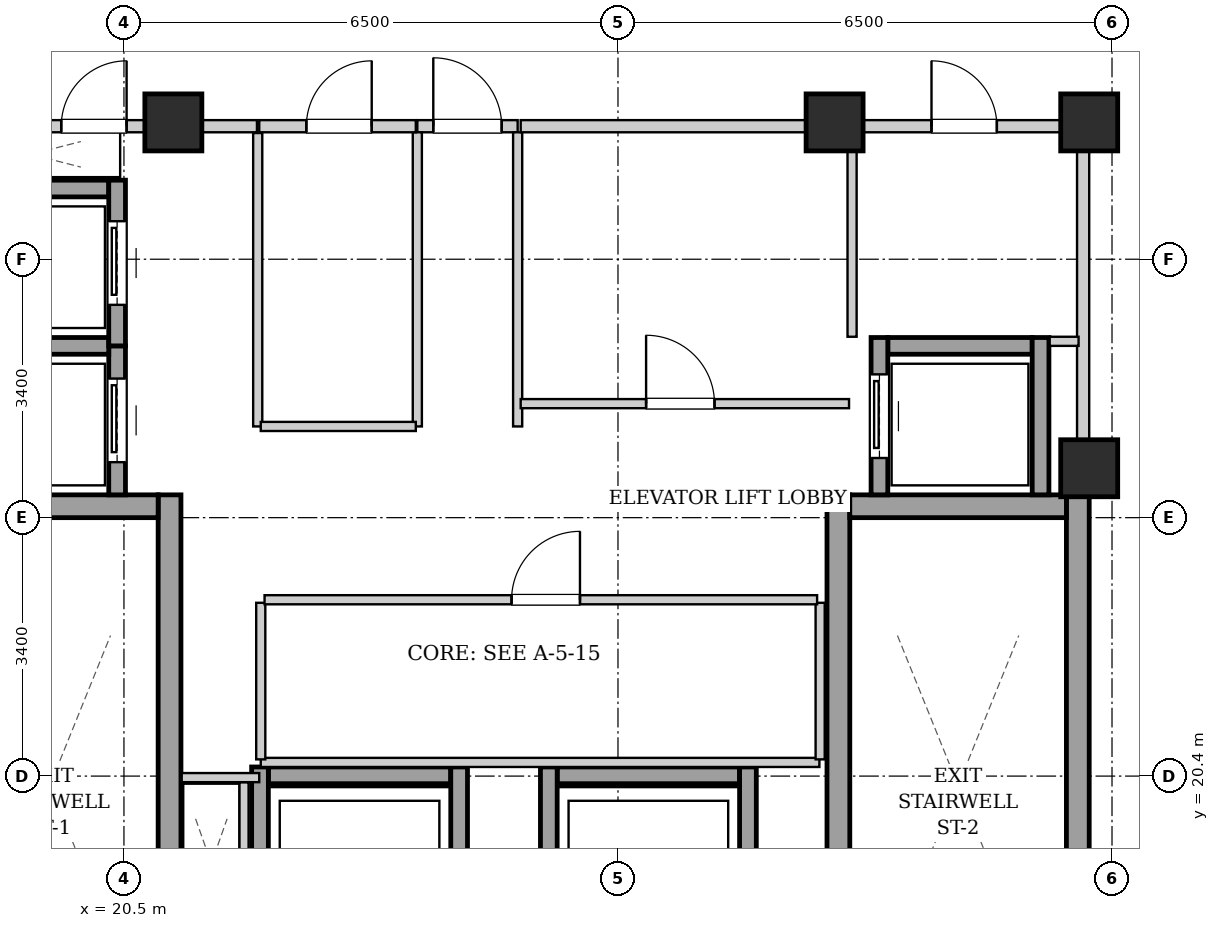
"""IFC4 building model, lengths in metres.
Left out: names, types, materials, properties, quantities, classifications, styles, units other than length and angle.
Written with IfcOpenShell. Run it as: python <this file> out.ifc"""

import sys

from ifc_helpers import new_model, si_unit, direction, frame, frame_2d, origin, origin_2d, place, context, subcontext, project, spatial, rectangle, extrude, element, fill, save


model = new_model("IFC4")
c1 = context("Model", 3, precision=1e-05, world=origin(), true_north=direction((0.0, 1.0)))
c2 = subcontext(c1, "Body", "Model", "MODEL_VIEW")
j1 = project(units=[si_unit("LENGTHUNIT", "METRE"), si_unit("PLANEANGLEUNIT", "RADIAN")], contexts=[c1])
p1 = place(None, origin())
s1 = spatial("IfcSite", under=j1, at=p1, CompositionType="ELEMENT")
p2 = place(p1, origin())
s2 = spatial("IfcBuilding", under=s1, at=p2, CompositionType="ELEMENT")
p3 = place(p2, frame((0.0, 0.0, 224.1)))
s3 = spatial("IfcBuildingStorey", under=s2, at=p3, CompositionType="ELEMENT", Elevation=224.1)
for number, where, z_axis, x_axis in (
    (1, (21.15, 29.0, 0.0), (0.0, 0.0, 1.0), (1.0, 0.0, 0.0)),
    (2, (29.85, 29.0, 0.0), (0.0, 0.0, 1.0), (1.0, 0.0, 0.0)),
    (3, (33.2, 29.0, 0.0), (0.0, 0.0, 1.0), (1.0, 0.0, 0.0)),
    (4, (33.2, 24.45, 0.0), (0.0, 0.0, 1.0), (1.0, 0.0, 0.0)),
):
    element("IfcColumn", number, at=place(p3, frame(where, z_axis=z_axis, x_axis=x_axis)), inside=s3, PredefinedType="COLUMN", context=c2, shape_type="SweptSolid", body=[
        extrude(rectangle(XDim=0.75, YDim=0.75, at=origin_2d()), origin(), (0.0, 0.0, 1.0), 3.4),
    ])
p4 = place(p3, frame((21.1, 15.1, 0.0), z_axis=(0.0, 0.0, 1.0), x_axis=(0.0, 1.0, 0.0)))
e5 = element("IfcWall", 5, at=p4, inside=s3, PredefinedType="SHEAR", context=c2, shape_type="SweptSolid", body=[
    extrude(rectangle(XDim=9.0, YDim=0.3, at=frame_2d((4.5, 0.0))), origin(), (0.0, 0.0, 1.0), 3.14),
])
p5 = place(p3, frame((18.1, 23.95, 0.0), z_axis=(0.0, 0.0, 1.0), x_axis=(1.0, 0.0, 0.0)))
e6 = element("IfcWall", 6, at=p5, inside=s3, PredefinedType="SHEAR", context=c2, shape_type="SweptSolid", body=[
    extrude(rectangle(XDim=2.85, YDim=0.3, at=frame_2d((1.425, 0.0))), origin(), (0.0, 0.0, 1.0), 3.14),
])
for number, where, z_axis, x_axis in (
    (7, (29.9, 15.1, 0.0), (0.0, 0.0, 1.0), (0.0, 1.0, 0.0)),
    (8, (33.05, 15.1, 0.0), (0.0, 0.0, 1.0), (0.0, 1.0, 0.0)),
):
    element("IfcWall", number, at=place(p3, frame(where, z_axis=z_axis, x_axis=x_axis)), inside=s3, PredefinedType="SHEAR", context=c2, shape_type="SweptSolid", body=[
        extrude(rectangle(XDim=9.0, YDim=0.3, at=frame_2d((4.5, 0.0))), origin(), (0.0, 0.0, 1.0), 3.14),
    ])
p6 = place(p3, frame((30.05, 23.95, 0.0), z_axis=(0.0, 0.0, 1.0), x_axis=(1.0, 0.0, 0.0)))
e9 = element("IfcWall", 9, at=p6, inside=s3, PredefinedType="SHEAR", context=c2, shape_type="SweptSolid", body=[
    extrude(rectangle(XDim=2.85, YDim=0.3, at=frame_2d((1.425, 0.0))), origin(), (0.0, 0.0, 1.0), 3.14),
])
p7 = place(p3, frame((20.41, 24.1, 0.0), z_axis=(0.0, 0.0, 1.0), x_axis=(0.0, 1.0, 0.0)))
e10 = element("IfcWall", 10, at=p7, inside=s3, PredefinedType="SHEAR", context=c2, shape_type="SweptSolid", body=[
    extrude(rectangle(XDim=1.96, YDim=0.22, at=frame_2d((0.98, 0.0))), origin(), (0.0, 0.0, 1.0), 3.14),
])
p8 = place(p7, frame((0.43, 0.0, 0.0)))
e11 = element("IfcOpeningElement", 11, at=p8, cuts=e10, PredefinedType="OPENING", context=c2, shape_type="SweptSolid", body=[
    extrude(rectangle(XDim=1.1, YDim=2.15, at=frame_2d((0.55, 1.075))), frame((0.0, 0.12, 0.0), z_axis=(0.0, -1.0, 0.0), x_axis=(1.0, 0.0, 0.0)), (0.0, 0.0, 1.0), 0.24),
])
for number, where, z_axis, x_axis in (
    (12, (18.4, 26.06, 0.0), (0.0, 0.0, 1.0), (1.0, 0.0, 0.0)),
    (13, (18.4, 28.13, 0.0), (0.0, 0.0, 1.0), (1.0, 0.0, 0.0)),
):
    element("IfcWall", number, at=place(p3, frame(where, z_axis=z_axis, x_axis=x_axis)), inside=s3, PredefinedType="SHEAR", context=c2, shape_type="SweptSolid", body=[
        extrude(rectangle(XDim=1.9, YDim=0.22, at=frame_2d((0.95, 0.0))), origin(), (0.0, 0.0, 1.0), 3.14),
    ])
p9 = place(p3, frame((20.41, 26.06, 0.0), z_axis=(0.0, 0.0, 1.0), x_axis=(0.0, 1.0, 0.0)))
e14 = element("IfcWall", 14, at=p9, inside=s3, PredefinedType="SHEAR", context=c2, shape_type="SweptSolid", body=[
    extrude(rectangle(XDim=2.18, YDim=0.22, at=frame_2d((1.09, 0.0))), origin(), (0.0, 0.0, 1.0), 3.14),
])
p10 = place(p9, frame((0.54, 0.0, 0.0)))
e15 = element("IfcOpeningElement", 15, at=p10, cuts=e14, PredefinedType="OPENING", context=c2, shape_type="SweptSolid", body=[
    extrude(rectangle(XDim=1.1, YDim=2.15, at=frame_2d((0.55, 1.075))), frame((0.0, 0.12, 0.0), z_axis=(0.0, -1.0, 0.0), x_axis=(1.0, 0.0, 0.0)), (0.0, 0.0, 1.0), 0.24),
])
p11 = place(p3, frame((30.55, 26.06, 0.0), z_axis=(0.0, 0.0, 1.0), x_axis=(1.0, 0.0, 0.0)))
e16 = element("IfcWall", 16, at=p11, inside=s3, PredefinedType="SHEAR", context=c2, shape_type="SweptSolid", body=[
    extrude(rectangle(XDim=1.9, YDim=0.22, at=frame_2d((0.95, 0.0))), origin(), (0.0, 0.0, 1.0), 3.14),
])
p12 = place(p3, frame((30.44, 24.1, 0.0), z_axis=(0.0, 0.0, 1.0), x_axis=(0.0, 1.0, 0.0)))
e17 = element("IfcWall", 17, at=p12, inside=s3, PredefinedType="SHEAR", context=c2, shape_type="SweptSolid", body=[
    extrude(rectangle(XDim=2.07, YDim=0.22, at=frame_2d((1.035, 0.0))), origin(), (0.0, 0.0, 1.0), 3.14),
])
p13 = place(p12, frame((0.485, 0.0, 0.0)))
e18 = element("IfcOpeningElement", 18, at=p13, cuts=e17, PredefinedType="OPENING", context=c2, shape_type="SweptSolid", body=[
    extrude(rectangle(XDim=1.1, YDim=2.15, at=frame_2d((0.55, 1.075))), frame((0.0, 0.12, 0.0), z_axis=(0.0, -1.0, 0.0), x_axis=(1.0, 0.0, 0.0)), (0.0, 0.0, 1.0), 0.24),
])
p14 = place(p3, frame((32.56, 24.1, 0.0), z_axis=(0.0, 0.0, 1.0), x_axis=(0.0, 1.0, 0.0)))
e19 = element("IfcWall", 19, at=p14, inside=s3, PredefinedType="SHEAR", context=c2, shape_type="SweptSolid", body=[
    extrude(rectangle(XDim=2.07, YDim=0.22, at=frame_2d((1.035, 0.0))), origin(), (0.0, 0.0, 1.0), 3.14),
])
p15 = place(p3, frame((22.4, 20.41, 0.0), z_axis=(0.0, 0.0, 1.0), x_axis=(1.0, 0.0, 0.0)))
e20 = element("IfcWall", 20, at=p15, inside=s3, PredefinedType="SHEAR", context=c2, shape_type="SweptSolid", body=[
    extrude(rectangle(XDim=2.4, YDim=0.22, at=frame_2d((1.2, 0.0))), origin(), (0.0, 0.0, 1.0), 3.14),
])
for number, where, z_axis, x_axis in (
    (21, (22.29, 17.98, 0.0), (0.0, 0.0, 1.0), (0.0, 1.0, 0.0)),
    (22, (24.91, 17.98, 0.0), (0.0, 0.0, 1.0), (0.0, 1.0, 0.0)),
):
    element("IfcWall", number, at=place(p3, frame(where, z_axis=z_axis, x_axis=x_axis)), inside=s3, PredefinedType="SHEAR", context=c2, shape_type="SweptSolid", body=[
        extrude(rectangle(XDim=2.54, YDim=0.22, at=frame_2d((1.27, 0.0))), origin(), (0.0, 0.0, 1.0), 3.14),
    ])
p16 = place(p3, frame((26.2, 20.41, 0.0), z_axis=(0.0, 0.0, 1.0), x_axis=(1.0, 0.0, 0.0)))
e23 = element("IfcWall", 23, at=p16, inside=s3, PredefinedType="SHEAR", context=c2, shape_type="SweptSolid", body=[
    extrude(rectangle(XDim=2.4, YDim=0.22, at=frame_2d((1.2, 0.0))), origin(), (0.0, 0.0, 1.0), 3.14),
])
for number, where, z_axis, x_axis in (
    (24, (26.09, 17.98, 0.0), (0.0, 0.0, 1.0), (0.0, 1.0, 0.0)),
    (25, (28.71, 17.98, 0.0), (0.0, 0.0, 1.0), (0.0, 1.0, 0.0)),
):
    element("IfcWall", number, at=place(p3, frame(where, z_axis=z_axis, x_axis=x_axis)), inside=s3, PredefinedType="SHEAR", context=c2, shape_type="SweptSolid", body=[
        extrude(rectangle(XDim=2.54, YDim=0.22, at=frame_2d((1.27, 0.0))), origin(), (0.0, 0.0, 1.0), 3.14),
    ])
p17 = place(p3, frame((33.12, 24.12, 0.0), z_axis=(0.0, 0.0, 1.0), x_axis=(0.0, 1.0, 0.0)))
e26 = element("IfcWall", 26, at=p17, inside=s3, PredefinedType="PARTITIONING", context=c2, shape_type="SweptSolid", body=[
    extrude(rectangle(XDim=4.76, YDim=0.16, at=frame_2d((2.38, 0.0))), origin(), (0.0, 0.0, 1.0), 3.14),
])
p18 = place(p3, frame((24.36, 28.95, 0.0), z_axis=(0.0, 0.0, 1.0), x_axis=(1.0, 0.0, 0.0)))
e27 = element("IfcWall", 27, at=p18, inside=s3, PredefinedType="PARTITIONING", context=c2, shape_type="SweptSolid", body=[
    extrude(rectangle(XDim=1.32, YDim=0.16, at=frame_2d((0.66, 0.0))), origin(), (0.0, 0.0, 1.0), 2.668),
])
p19 = place(p18, frame((0.21, 0.0, 0.0)))
e28 = element("IfcOpeningElement", 28, at=p19, cuts=e27, PredefinedType="OPENING", context=c2, shape_type="SweptSolid", body=[
    extrude(rectangle(XDim=0.9, YDim=2.05, at=frame_2d((0.45, 1.025))), frame((0.0, 0.09, 0.0), z_axis=(0.0, -1.0, 0.0), x_axis=(1.0, 0.0, 0.0)), (0.0, 0.0, 1.0), 0.18),
])
p20 = place(p3, frame((17.96, 28.95, 0.0), z_axis=(0.0, 0.0, 1.0), x_axis=(1.0, 0.0, 0.0)))
e29 = element("IfcWall", 29, at=p20, inside=s3, PredefinedType="PARTITIONING", context=c2, shape_type="SweptSolid", body=[
    extrude(rectangle(XDim=4.29, YDim=0.16, at=frame_2d((2.145, 0.0))), origin(), (0.0, 0.0, 1.0), 2.668),
])
p21 = place(p20, frame((1.715, 0.0, 0.0)))
e30 = element("IfcOpeningElement", 30, at=p21, cuts=e29, PredefinedType="OPENING", context=c2, shape_type="SweptSolid", body=[
    extrude(rectangle(XDim=0.86, YDim=2.05, at=frame_2d((0.43, 1.025))), frame((0.0, 0.09, 0.0), z_axis=(0.0, -1.0, 0.0), x_axis=(1.0, 0.0, 0.0)), (0.0, 0.0, 1.0), 0.18),
])
p22 = place(p3, frame((22.08, 18.2, 0.0), z_axis=(0.0, 0.0, 1.0), x_axis=(0.0, 1.0, 0.0)))
e31 = element("IfcWall", 31, at=p22, inside=s3, PredefinedType="PARTITIONING", context=c2, shape_type="SweptSolid", body=[
    extrude(rectangle(XDim=2.12, YDim=0.12, at=frame_2d((1.06, 0.0))), origin(), (0.0, 0.0, 1.0), 3.14),
])
p23 = place(p3, frame((22.28, 20.38, 0.0), z_axis=(0.0, 0.0, 1.0), x_axis=(-1.0, 0.0, 0.0)))
e32 = element("IfcWall", 32, at=p23, inside=s3, PredefinedType="PARTITIONING", context=c2, shape_type="SweptSolid", body=[
    extrude(rectangle(XDim=1.02, YDim=0.12, at=frame_2d((0.51, 0.0))), origin(), (0.0, 0.0, 1.0), 3.14),
])
for number, where, z_axis, x_axis in (
    (33, (24.36, 25.0, 0.0), (0.0, 0.0, 1.0), (0.0, 1.0, 0.0)),
    (34, (25.68, 25.0, 0.0), (0.0, 0.0, 1.0), (0.0, 1.0, 0.0)),
):
    element("IfcWall", number, at=place(p3, frame(where, z_axis=z_axis, x_axis=x_axis)), inside=s3, PredefinedType="PARTITIONING", context=c2, shape_type="SweptSolid", body=[
        extrude(rectangle(XDim=3.87, YDim=0.12, at=frame_2d((1.935, 0.0))), origin(), (0.0, 0.0, 1.0), 3.14),
    ])
p24 = place(p3, frame((30.08, 26.18, 0.0), z_axis=(0.0, 0.0, 1.0), x_axis=(0.0, 1.0, 0.0)))
e35 = element("IfcWall", 35, at=p24, inside=s3, PredefinedType="PARTITIONING", context=c2, shape_type="SweptSolid", body=[
    extrude(rectangle(XDim=2.68, YDim=0.12, at=frame_2d((1.34, 0.0))), origin(), (0.0, 0.0, 1.0), 3.14),
])
p25 = place(p3, frame((32.68, 26.12, 0.0), z_axis=(0.0, 0.0, 1.0), x_axis=(1.0, 0.0, 0.0)))
e36 = element("IfcWall", 36, at=p25, inside=s3, PredefinedType="PARTITIONING", context=c2, shape_type="SweptSolid", body=[
    extrude(rectangle(XDim=0.38, YDim=0.12, at=frame_2d((0.19, 0.0))), origin(), (0.0, 0.0, 1.0), 3.14),
])
p26 = place(p3, frame((30.08, 28.95, 0.0), z_axis=(0.0, 0.0, 1.0), x_axis=(1.0, 0.0, 0.0)))
e37 = element("IfcWall", 37, at=p26, inside=s3, PredefinedType="PARTITIONING", context=c2, shape_type="SweptSolid", body=[
    extrude(rectangle(XDim=2.96, YDim=0.16, at=frame_2d((1.48, 0.0))), origin(), (0.0, 0.0, 1.0), 3.14),
])
p27 = place(p26, frame((1.045, 0.0, 0.0)))
e38 = element("IfcOpeningElement", 38, at=p27, cuts=e37, PredefinedType="OPENING", context=c2, shape_type="SweptSolid", body=[
    extrude(rectangle(XDim=0.86, YDim=2.05, at=frame_2d((0.43, 1.025))), frame((0.0, 0.09, 0.0), z_axis=(0.0, -1.0, 0.0), x_axis=(1.0, 0.0, 0.0)), (0.0, 0.0, 1.0), 0.18),
])
p28 = place(p3, frame((22.26, 25.0, 0.0), z_axis=(0.0, 0.0, 1.0), x_axis=(0.0, 1.0, 0.0)))
e39 = element("IfcWall", 39, at=p28, inside=s3, PredefinedType="PARTITIONING", context=c2, shape_type="SweptSolid", body=[
    extrude(rectangle(XDim=3.86, YDim=0.12, at=frame_2d((1.93, 0.0))), origin(), (0.0, 0.0, 1.0), 3.14),
])
p29 = place(p3, frame((22.3, 25.0, 0.0), z_axis=(0.0, 0.0, 1.0), x_axis=(1.0, 0.0, 0.0)))
e40 = element("IfcWall", 40, at=p29, inside=s3, PredefinedType="PARTITIONING", context=c2, shape_type="SweptSolid", body=[
    extrude(rectangle(XDim=2.04, YDim=0.12, at=frame_2d((1.02, 0.0))), origin(), (0.0, 0.0, 1.0), 3.14),
])
p30 = place(p3, frame((22.28, 28.95, 0.0), z_axis=(0.0, 0.0, 1.0), x_axis=(1.0, 0.0, 0.0)))
e41 = element("IfcWall", 41, at=p30, inside=s3, PredefinedType="PARTITIONING", context=c2, shape_type="SweptSolid", body=[
    extrude(rectangle(XDim=2.06, YDim=0.16, at=frame_2d((1.03, 0.0))), origin(), (0.0, 0.0, 1.0), 2.668),
])
p31 = place(p30, frame((0.62, 0.0, 0.0)))
e42 = element("IfcOpeningElement", 42, at=p31, cuts=e41, PredefinedType="OPENING", context=c2, shape_type="SweptSolid", body=[
    extrude(rectangle(XDim=0.86, YDim=2.05, at=frame_2d((0.43, 1.025))), frame((0.0, 0.09, 0.0), z_axis=(0.0, -1.0, 0.0), x_axis=(1.0, 0.0, 0.0)), (0.0, 0.0, 1.0), 0.18),
])
p32 = place(p3, frame((25.72, 28.95, 0.0), z_axis=(0.0, 0.0, 1.0), x_axis=(1.0, 0.0, 0.0)))
e43 = element("IfcWall", 43, at=p32, inside=s3, PredefinedType="PARTITIONING", context=c2, shape_type="SweptSolid", body=[
    extrude(rectangle(XDim=4.32, YDim=0.16, at=frame_2d((2.16, 0.0))), origin(), (0.0, 0.0, 1.0), 2.668),
])
p33 = place(p3, frame((25.72, 25.3, 0.0), z_axis=(0.0, 0.0, 1.0), x_axis=(1.0, 0.0, 0.0)))
e44 = element("IfcWall", 44, at=p33, inside=s3, PredefinedType="PARTITIONING", context=c2, shape_type="SweptSolid", body=[
    extrude(rectangle(XDim=4.32, YDim=0.12, at=frame_2d((2.16, 0.0))), origin(), (0.0, 0.0, 1.0), 3.14),
])
p34 = place(p33, frame((1.65, 0.0, 0.0)))
e45 = element("IfcOpeningElement", 45, at=p34, cuts=e44, PredefinedType="OPENING", context=c2, shape_type="SweptSolid", body=[
    extrude(rectangle(XDim=0.9, YDim=2.05, at=frame_2d((0.45, 1.025))), frame((0.0, 0.07, 0.0), z_axis=(0.0, -1.0, 0.0), x_axis=(1.0, 0.0, 0.0)), (0.0, 0.0, 1.0), 0.14),
])
p35 = place(p3, frame((22.3, 20.58, 0.0), z_axis=(0.0, 0.0, 1.0), x_axis=(1.0, 0.0, 0.0)))
e46 = element("IfcWall", 46, at=p35, inside=s3, PredefinedType="PARTITIONING", context=c2, shape_type="SweptSolid", body=[
    extrude(rectangle(XDim=7.35, YDim=0.12, at=frame_2d((3.675, 0.0))), origin(), (0.0, 0.0, 1.0), 3.14),
])
for number, where, z_axis, x_axis in (
    (47, (22.3, 20.62, 0.0), (0.0, 0.0, 1.0), (0.0, 1.0, 0.0)),
    (48, (29.66, 20.62, 0.0), (0.0, 0.0, 1.0), (0.0, 1.0, 0.0)),
):
    element("IfcWall", number, at=place(p3, frame(where, z_axis=z_axis, x_axis=x_axis)), inside=s3, PredefinedType="PARTITIONING", context=c2, shape_type="SweptSolid", body=[
        extrude(rectangle(XDim=2.06, YDim=0.12, at=frame_2d((1.03, 0.0))), origin(), (0.0, 0.0, 1.0), 3.14),
    ])
p36 = place(p3, frame((22.35, 22.72, 0.0), z_axis=(0.0, 0.0, 1.0), x_axis=(1.0, 0.0, 0.0)))
e49 = element("IfcWall", 49, at=p36, inside=s3, PredefinedType="PARTITIONING", context=c2, shape_type="SweptSolid", body=[
    extrude(rectangle(XDim=7.27, YDim=0.12, at=frame_2d((3.635, 0.0))), origin(), (0.0, 0.0, 1.0), 3.14),
])
p37 = place(p36, frame((3.25, 0.0, 0.0)))
e50 = element("IfcOpeningElement", 50, at=p37, cuts=e49, PredefinedType="OPENING", context=c2, shape_type="SweptSolid", body=[
    extrude(rectangle(XDim=0.9, YDim=2.05, at=frame_2d((0.45, 1.025))), frame((0.0, 0.07, 0.0), z_axis=(0.0, -1.0, 0.0), x_axis=(1.0, 0.0, 0.0)), (0.0, 0.0, 1.0), 0.14),
])
p38 = place(p8, origin())
e51 = element("IfcDoor", 51, at=p38, inside=s3, OperationType="SLIDING_TO_LEFT", PredefinedType="DOOR", context=c2, shape_type="SweptSolid", body=[
    extrude(rectangle(XDim=1.1, YDim=2.15, at=frame_2d((0.55, 1.075))), frame((0.0, 0.025, 0.0), z_axis=(0.0, -1.0, 0.0), x_axis=(1.0, 0.0, 0.0)), (0.0, 0.0, 1.0), 0.05),
])
fill(e11, e51)
p39 = place(p10, origin())
e52 = element("IfcDoor", 52, at=p39, inside=s3, OperationType="SLIDING_TO_LEFT", PredefinedType="DOOR", context=c2, shape_type="SweptSolid", body=[
    extrude(rectangle(XDim=1.1, YDim=2.15, at=frame_2d((0.55, 1.075))), frame((0.0, 0.025, 0.0), z_axis=(0.0, -1.0, 0.0), x_axis=(1.0, 0.0, 0.0)), (0.0, 0.0, 1.0), 0.05),
])
fill(e15, e52)
p40 = place(p13, origin())
e53 = element("IfcDoor", 53, at=p40, inside=s3, OperationType="SLIDING_TO_LEFT", PredefinedType="DOOR", context=c2, shape_type="SweptSolid", body=[
    extrude(rectangle(XDim=1.1, YDim=2.15, at=frame_2d((0.55, 1.075))), frame((0.0, 0.025, 0.0), z_axis=(0.0, -1.0, 0.0), x_axis=(1.0, 0.0, 0.0)), (0.0, 0.0, 1.0), 0.05),
])
fill(e18, e53)
p41 = place(p19, origin())
e54 = element("IfcDoor", 54, at=p41, inside=s3, OperationType="SINGLE_SWING_LEFT", PredefinedType="DOOR", context=c2, shape_type="SweptSolid", body=[
    extrude(rectangle(XDim=0.9, YDim=2.05, at=frame_2d((0.45, 1.025))), frame((0.0, 0.025, 0.0), z_axis=(0.0, -1.0, 0.0), x_axis=(1.0, 0.0, 0.0)), (0.0, 0.0, 1.0), 0.05),
])
fill(e28, e54)
p42 = place(p21, origin())
e55 = element("IfcDoor", 55, at=p42, inside=s3, OperationType="SINGLE_SWING_RIGHT", PredefinedType="DOOR", context=c2, shape_type="SweptSolid", body=[
    extrude(rectangle(XDim=0.86, YDim=2.05, at=frame_2d((0.43, 1.025))), frame((0.0, 0.025, 0.0), z_axis=(0.0, -1.0, 0.0), x_axis=(1.0, 0.0, 0.0)), (0.0, 0.0, 1.0), 0.05),
])
fill(e30, e55)
p43 = place(p27, origin())
e56 = element("IfcDoor", 56, at=p43, inside=s3, OperationType="SINGLE_SWING_LEFT", PredefinedType="DOOR", context=c2, shape_type="SweptSolid", body=[
    extrude(rectangle(XDim=0.86, YDim=2.05, at=frame_2d((0.43, 1.025))), frame((0.0, 0.025, 0.0), z_axis=(0.0, -1.0, 0.0), x_axis=(1.0, 0.0, 0.0)), (0.0, 0.0, 1.0), 0.05),
])
fill(e38, e56)
p44 = place(p31, origin())
e57 = element("IfcDoor", 57, at=p44, inside=s3, OperationType="SINGLE_SWING_RIGHT", PredefinedType="DOOR", context=c2, shape_type="SweptSolid", body=[
    extrude(rectangle(XDim=0.86, YDim=2.05, at=frame_2d((0.43, 1.025))), frame((0.0, 0.025, 0.0), z_axis=(0.0, -1.0, 0.0), x_axis=(1.0, 0.0, 0.0)), (0.0, 0.0, 1.0), 0.05),
])
fill(e42, e57)
p45 = place(p34, origin())
e58 = element("IfcDoor", 58, at=p45, inside=s3, OperationType="SINGLE_SWING_LEFT", PredefinedType="DOOR", context=c2, shape_type="SweptSolid", body=[
    extrude(rectangle(XDim=0.9, YDim=2.05, at=frame_2d((0.45, 1.025))), frame((0.0, 0.025, 0.0), z_axis=(0.0, -1.0, 0.0), x_axis=(1.0, 0.0, 0.0)), (0.0, 0.0, 1.0), 0.05),
])
fill(e45, e58)
p46 = place(p37, origin())
e59 = element("IfcDoor", 59, at=p46, inside=s3, OperationType="SINGLE_SWING_RIGHT", PredefinedType="DOOR", context=c2, shape_type="SweptSolid", body=[
    extrude(rectangle(XDim=0.9, YDim=2.05, at=frame_2d((0.45, 1.025))), frame((0.0, 0.025, 0.0), z_axis=(0.0, -1.0, 0.0), x_axis=(1.0, 0.0, 0.0)), (0.0, 0.0, 1.0), 0.05),
])
fill(e50, e59)
save(model, sys.argv[1])
